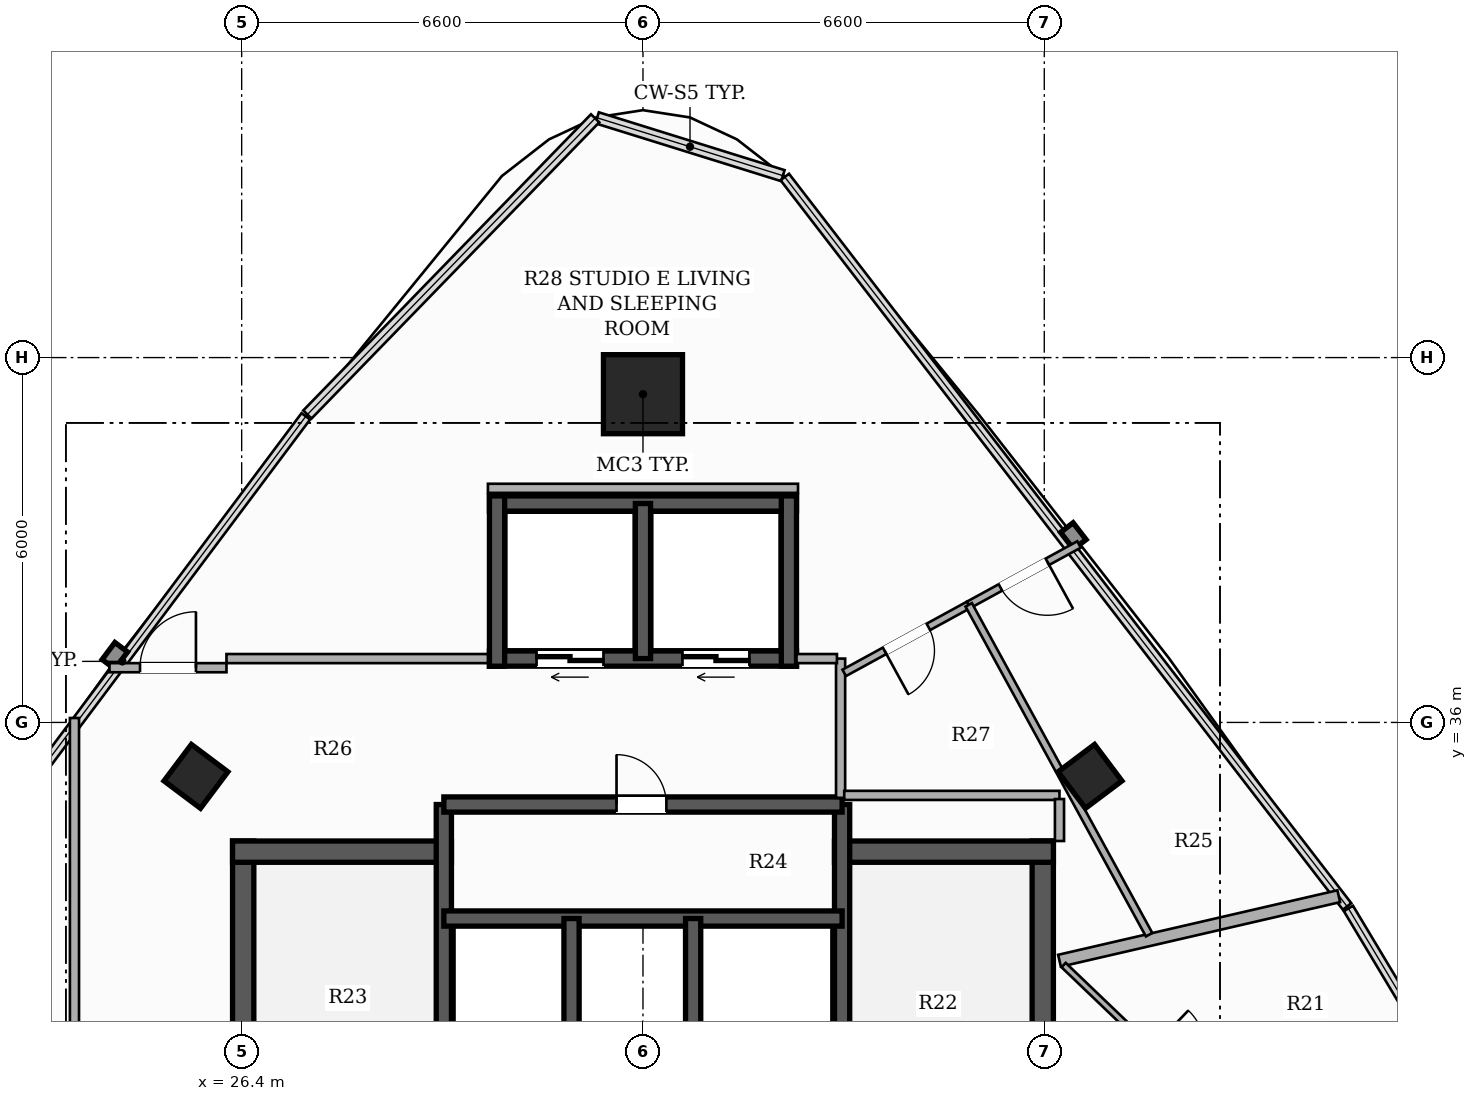
"""IFC4 building model, lengths in metres.
Left out: names, types, materials, properties, quantities, classifications, styles, units other than length and angle.
Written with IfcOpenShell. Run it as: python <this file> out.ifc"""

import sys

from ifc_helpers import new_model, si_unit, direction, frame, frame_2d, origin, origin_2d, place, context, subcontext, project, spatial, rectangle, hollow_rectangle, extrude, element, fill, save


model = new_model("IFC4")
c1 = context("Model", 3, precision=1e-05, world=origin(), true_north=direction((0.0, 1.0)))
c2 = subcontext(c1, "Body", "Model", "MODEL_VIEW")
j1 = project(units=[si_unit("LENGTHUNIT", "METRE"), si_unit("PLANEANGLEUNIT", "RADIAN")], contexts=[c1])
p1 = place(None, origin())
s1 = spatial("IfcSite", under=j1, at=p1, CompositionType="ELEMENT")
p2 = place(p1, origin())
s2 = spatial("IfcBuilding", under=s1, at=p2, CompositionType="ELEMENT")
p3 = place(p2, frame((0.0, 0.0, 222.8)))
s3 = spatial("IfcBuildingStorey", under=s2, at=p3, CompositionType="ELEMENT", Elevation=222.8)
p4 = place(p3, frame((26.425, 26.55, 0.0), z_axis=(0.0, 0.0, 1.0), x_axis=(0.0, 1.0, 0.0)))
e1 = element("IfcWall", 1, at=p4, inside=s3, PredefinedType="SHEAR", context=c2, shape_type="SweptSolid", body=[
    extrude(rectangle(XDim=7.5, YDim=0.35, at=frame_2d((3.75, 0.0))), origin(), (0.0, 0.0, 1.0), 3.3),
])
p5 = place(p3, frame((26.25, 33.875, 0.0), z_axis=(0.0, 0.0, 1.0), x_axis=(1.0, 0.0, 0.0)))
e2 = element("IfcWall", 2, at=p5, inside=s3, PredefinedType="SHEAR", context=c2, shape_type="SweptSolid", body=[
    extrude(rectangle(XDim=3.6, YDim=0.35, at=frame_2d((1.8, 0.0))), origin(), (0.0, 0.0, 1.0), 3.3),
])
p6 = place(p3, frame((39.575, 26.55, 0.0), z_axis=(0.0, 0.0, 1.0), x_axis=(0.0, 1.0, 0.0)))
e3 = element("IfcWall", 3, at=p6, inside=s3, PredefinedType="SHEAR", context=c2, shape_type="SweptSolid", body=[
    extrude(rectangle(XDim=7.5, YDim=0.35, at=frame_2d((3.75, 0.0))), origin(), (0.0, 0.0, 1.0), 3.3),
])
p7 = place(p3, frame((36.15, 33.875, 0.0), z_axis=(0.0, 0.0, 1.0), x_axis=(1.0, 0.0, 0.0)))
e4 = element("IfcWall", 4, at=p7, inside=s3, PredefinedType="SHEAR", context=c2, shape_type="SweptSolid", body=[
    extrude(rectangle(XDim=3.6, YDim=0.35, at=frame_2d((1.8, 0.0))), origin(), (0.0, 0.0, 1.0), 3.3),
])
p8 = place(p3, frame((29.725, 26.55, 0.0), z_axis=(0.0, 0.0, 1.0), x_axis=(0.0, 1.0, 0.0)))
e5 = element("IfcWall", 5, at=p8, inside=s3, PredefinedType="SHEAR", context=c2, shape_type="SweptSolid", body=[
    extrude(rectangle(XDim=8.1, YDim=0.25, at=frame_2d((4.05, 0.0))), origin(), (0.0, 0.0, 1.0), 3.3),
])
p9 = place(p8, frame((0.6, 0.0, 0.0)))
e6 = element("IfcOpeningElement", 6, at=p9, cuts=e5, PredefinedType="OPENING", context=c2, shape_type="SweptSolid", body=[
    extrude(rectangle(XDim=1.05, YDim=2.15, at=frame_2d((0.525, 1.075))), frame((0.0, 0.135, 0.0), z_axis=(0.0, -1.0, 0.0), x_axis=(1.0, 0.0, 0.0)), (0.0, 0.0, 1.0), 0.27),
])
p10 = place(p3, frame((36.275, 26.55, 0.0), z_axis=(0.0, 0.0, 1.0), x_axis=(0.0, 1.0, 0.0)))
e7 = element("IfcWall", 7, at=p10, inside=s3, PredefinedType="SHEAR", context=c2, shape_type="SweptSolid", body=[
    extrude(rectangle(XDim=8.1, YDim=0.25, at=frame_2d((4.05, 0.0))), origin(), (0.0, 0.0, 1.0), 3.3),
])
p11 = place(p10, frame((0.6, 0.0, 0.0)))
e8 = element("IfcOpeningElement", 8, at=p11, cuts=e7, PredefinedType="OPENING", context=c2, shape_type="SweptSolid", body=[
    extrude(rectangle(XDim=1.05, YDim=2.15, at=frame_2d((0.525, 1.075))), frame((0.0, 0.135, 0.0), z_axis=(0.0, -1.0, 0.0), x_axis=(1.0, 0.0, 0.0)), (0.0, 0.0, 1.0), 0.27),
])
p12 = place(p3, frame((29.725, 32.775, 0.0), z_axis=(0.0, 0.0, 1.0), x_axis=(1.0, 0.0, 0.0)))
e9 = element("IfcWall", 9, at=p12, inside=s3, PredefinedType="SHEAR", context=c2, shape_type="SweptSolid", body=[
    extrude(rectangle(XDim=6.55, YDim=0.25, at=frame_2d((3.275, 0.0))), origin(), (0.0, 0.0, 1.0), 3.3),
])
for number, where, z_axis, x_axis in (
    (10, (31.825, 29.875, 0.0), (0.0, 0.0, 1.0), (0.0, 1.0, 0.0)),
    (11, (33.825, 29.875, 0.0), (0.0, 0.0, 1.0), (0.0, 1.0, 0.0)),
):
    element("IfcWall", number, at=place(p3, frame(where, z_axis=z_axis, x_axis=x_axis)), inside=s3, PredefinedType="SHEAR", context=c2, shape_type="SweptSolid", body=[
        extrude(rectangle(XDim=2.9, YDim=0.25, at=frame_2d((1.45, 0.0))), origin(), (0.0, 0.0, 1.0), 3.3),
    ])
p13 = place(p3, frame((29.725, 34.65, 0.0), z_axis=(0.0, 0.0, 1.0), x_axis=(1.0, 0.0, 0.0)))
e12 = element("IfcWall", 12, at=p13, inside=s3, PredefinedType="SHEAR", context=c2, shape_type="SweptSolid", body=[
    extrude(rectangle(XDim=6.55, YDim=0.25, at=frame_2d((3.275, 0.0))), origin(), (0.0, 0.0, 1.0), 3.3),
])
p14 = place(p13, frame((2.84, 0.0, 0.0)))
e13 = element("IfcOpeningElement", 13, at=p14, cuts=e12, PredefinedType="OPENING", context=c2, shape_type="SweptSolid", body=[
    extrude(rectangle(XDim=0.82, YDim=2.1, at=frame_2d((0.41, 1.05))), frame((0.0, 0.135, 0.0), z_axis=(0.0, -1.0, 0.0), x_axis=(1.0, 0.0, 0.0)), (0.0, 0.0, 1.0), 0.27),
])
p15 = place(p3, frame((35.525, 37.05, 0.0), z_axis=(0.0, 0.0, 1.0), x_axis=(-1.0, 0.0, 0.0)))
e14 = element("IfcWall", 14, at=p15, inside=s3, PredefinedType="SHEAR", context=c2, shape_type="SweptSolid", body=[
    extrude(rectangle(XDim=5.05, YDim=0.25, at=frame_2d((2.525, 0.0))), origin(), (0.0, 0.0, 1.0), 3.3),
])
p16 = place(p15, frame((3.175, 0.0, 0.0)))
e15 = element("IfcOpeningElement", 15, at=p16, cuts=e14, PredefinedType="OPENING", context=c2, shape_type="SweptSolid", body=[
    extrude(rectangle(XDim=1.1, YDim=2.2, at=frame_2d((0.55, 1.1))), frame((0.0, 0.135, 0.0), z_axis=(0.0, -1.0, 0.0), x_axis=(1.0, 0.0, 0.0)), (0.0, 0.0, 1.0), 0.27),
])
p17 = place(p15, frame((0.775, 0.0, 0.0)))
e16 = element("IfcOpeningElement", 16, at=p17, cuts=e14, PredefinedType="OPENING", context=c2, shape_type="SweptSolid", body=[
    extrude(rectangle(XDim=1.1, YDim=2.2, at=frame_2d((0.55, 1.1))), frame((0.0, 0.135, 0.0), z_axis=(0.0, -1.0, 0.0), x_axis=(1.0, 0.0, 0.0)), (0.0, 0.0, 1.0), 0.27),
])
p18 = place(p3, frame((30.475, 39.6, 0.0), z_axis=(0.0, 0.0, 1.0), x_axis=(1.0, 0.0, 0.0)))
e17 = element("IfcWall", 17, at=p18, inside=s3, PredefinedType="SHEAR", context=c2, shape_type="SweptSolid", body=[
    extrude(rectangle(XDim=5.05, YDim=0.25, at=frame_2d((2.525, 0.0))), origin(), (0.0, 0.0, 1.0), 3.3),
])
for number, where, z_axis, x_axis in (
    (18, (30.6, 36.925, 0.0), (0.0, 0.0, 1.0), (0.0, 1.0, 0.0)),
    (19, (35.4, 36.925, 0.0), (0.0, 0.0, 1.0), (0.0, 1.0, 0.0)),
):
    element("IfcWall", number, at=place(p3, frame(where, z_axis=z_axis, x_axis=x_axis)), inside=s3, PredefinedType="SHEAR", context=c2, shape_type="SweptSolid", body=[
        extrude(rectangle(XDim=2.8, YDim=0.25, at=frame_2d((1.4, 0.0))), origin(), (0.0, 0.0, 1.0), 3.3),
    ])
p19 = place(p3, frame((33.0, 37.05, 0.0), z_axis=(0.0, 0.0, 1.0), x_axis=(0.0, 1.0, 0.0)))
e20 = element("IfcWall", 20, at=p19, inside=s3, PredefinedType="SHEAR", context=c2, shape_type="SweptSolid", body=[
    extrude(rectangle(XDim=2.55, YDim=0.25, at=frame_2d((1.275, 0.0))), origin(), (0.0, 0.0, 1.0), 3.3),
])
p20 = place(p3, frame((33.0, 41.398, 0.0), z_axis=(0.0, 0.0, 1.0), x_axis=(1.0, 0.0, 0.0)))
e21 = element("IfcColumn", 21, at=p20, inside=s3, PredefinedType="COLUMN", context=c2, shape_type="SweptSolid", body=[
    extrude(hollow_rectangle(XDim=1.3, YDim=1.3, WallThickness=0.04, at=origin_2d()), origin(), (0.0, 0.0, 1.0), 3.3),
])
for number, where, z_axis, x_axis in (
    (22, (25.648, 35.113, 0.0), (0.0, 0.0, 1.0), (0.6, 0.8, 0.0)),
    (23, (40.352, 35.113, 0.0), (0.0, 0.0, 1.0), (-0.6, 0.8, 0.0)),
):
    element("IfcColumn", number, at=place(p3, frame(where, z_axis=z_axis, x_axis=x_axis)), inside=s3, PredefinedType="COLUMN", context=c2, shape_type="SweptSolid", body=[
        extrude(hollow_rectangle(XDim=0.75, YDim=0.75, WallThickness=0.025, at=origin_2d()), origin(), (0.0, 0.0, 1.0), 3.3),
    ])
p21 = place(p3, frame((36.25, 34.76, 0.0), z_axis=(0.0, 0.0, 1.0), x_axis=(0.0, 1.0, 0.0)))
e24 = element("IfcWall", 24, at=p21, inside=s3, PredefinedType="PARTITIONING", context=c2, shape_type="SweptSolid", body=[
    extrude(rectangle(XDim=2.29, YDim=0.15, at=frame_2d((1.145, 0.0))), origin(), (0.0, 0.0, 1.0), 2.425),
])
p22 = place(p3, frame((35.525, 37.05, 0.0), z_axis=(0.0, 0.0, 1.0), x_axis=(1.0, 0.0, 0.0)))
e25 = element("IfcWall", 25, at=p22, inside=s3, PredefinedType="PARTITIONING", context=c2, shape_type="SweptSolid", body=[
    extrude(rectangle(XDim=0.665, YDim=0.15, at=frame_2d((0.333, 0.0))), origin(), (0.0, 0.0, 1.0), 2.425),
])
p23 = place(p3, frame((23.65, 23.91, 0.0), z_axis=(0.0, 0.0, 1.0), x_axis=(0.0, 1.0, 0.0)))
e26 = element("IfcWall", 26, at=p23, inside=s3, PredefinedType="PARTITIONING", context=c2, shape_type="SweptSolid", body=[
    extrude(rectangle(XDim=12.163, YDim=0.15, at=frame_2d((6.082, 0.0))), origin(), (0.0, 0.0, 1.0), 2.492),
])
p24 = place(p23, frame((5.622, 0.0, 0.0)))
e27 = element("IfcOpeningElement", 27, at=p24, cuts=e26, PredefinedType="OPENING", context=c2, shape_type="SweptSolid", body=[
    extrude(rectangle(XDim=0.92, YDim=2.15, at=frame_2d((0.46, 1.075))), frame((0.0, 0.085, 0.0), z_axis=(0.0, -1.0, 0.0), x_axis=(1.0, 0.0, 0.0)), (0.0, 0.0, 1.0), 0.17),
])
p25 = place(p3, frame((24.226, 36.9, 0.0), z_axis=(0.0, 0.0, 1.0), x_axis=(1.0, 0.0, 0.0)))
e28 = element("IfcWall", 28, at=p25, inside=s3, PredefinedType="PARTITIONING", context=c2, shape_type="SweptSolid", body=[
    extrude(rectangle(XDim=1.924, YDim=0.15, at=frame_2d((0.962, 0.0))), origin(), (0.0, 0.0, 1.0), 2.619),
])
p26 = place(p25, frame((0.502, 0.0, 0.0)))
e29 = element("IfcOpeningElement", 29, at=p26, cuts=e28, PredefinedType="OPENING", context=c2, shape_type="SweptSolid", body=[
    extrude(rectangle(XDim=0.92, YDim=2.15, at=frame_2d((0.46, 1.075))), frame((0.0, 0.085, 0.0), z_axis=(0.0, -1.0, 0.0), x_axis=(1.0, 0.0, 0.0)), (0.0, 0.0, 1.0), 0.17),
])
p27 = place(p3, frame((26.15, 37.05, 0.0), z_axis=(0.0, 0.0, 1.0), x_axis=(1.0, 0.0, 0.0)))
e30 = element("IfcWall", 30, at=p27, inside=s3, PredefinedType="PARTITIONING", context=c2, shape_type="SweptSolid", body=[
    extrude(rectangle(XDim=4.3, YDim=0.15, at=frame_2d((2.15, 0.0))), origin(), (0.0, 0.0, 1.0), 2.425),
])
p28 = place(p3, frame((30.45, 39.85, 0.0), z_axis=(0.0, 0.0, 1.0), x_axis=(1.0, 0.0, 0.0)))
e31 = element("IfcWall", 31, at=p28, inside=s3, PredefinedType="PARTITIONING", context=c2, shape_type="SweptSolid", body=[
    extrude(rectangle(XDim=5.1, YDim=0.15, at=frame_2d((2.55, 0.0))), origin(), (0.0, 0.0, 1.0), 2.492),
])
p29 = place(p3, frame((36.31, 34.8, 0.0), z_axis=(0.0, 0.0, 1.0), x_axis=(1.0, 0.0, 0.0)))
e32 = element("IfcWall", 32, at=p29, inside=s3, PredefinedType="PARTITIONING", context=c2, shape_type="SweptSolid", body=[
    extrude(rectangle(XDim=3.54, YDim=0.15, at=frame_2d((1.77, 0.0))), origin(), (0.0, 0.0, 1.0), 2.425),
])
p30 = place(p3, frame((39.85, 34.74, 0.0), z_axis=(0.0, 0.0, 1.0), x_axis=(0.0, -1.0, 0.0)))
e33 = element("IfcWall", 33, at=p30, inside=s3, PredefinedType="PARTITIONING", context=c2, shape_type="SweptSolid", body=[
    extrude(rectangle(XDim=0.69, YDim=0.15, at=frame_2d((0.345, 0.0))), origin(), (0.0, 0.0, 1.0), 2.773),
])
p31 = place(p3, frame((39.85, 32.081, 0.0), z_axis=(0.0, 0.0, 1.0), x_axis=(0.974339670333, 0.225082666628, 0.0)))
e34 = element("IfcWall", 34, at=p31, inside=s3, PredefinedType="PARTITIONING", context=c2, shape_type="SweptSolid", body=[
    extrude(rectangle(XDim=4.714, YDim=0.2, at=frame_2d((2.357, 0.0))), origin(), (0.0, 0.0, 1.0), 2.492),
])
p32 = place(p3, frame((39.918, 32.01, 0.0), z_axis=(0.0, 0.0, 1.0), x_axis=(0.722311203135, -0.691568164266, 0.0)))
e35 = element("IfcWall", 35, at=p32, inside=s3, PredefinedType="PARTITIONING", context=c2, shape_type="SweptSolid", body=[
    extrude(rectangle(XDim=4.876, YDim=0.1, at=frame_2d((2.438, 0.0))), origin(), (0.0, 0.0, 1.0), 2.773),
])
p33 = place(p32, frame((1.998, 0.0, 0.0)))
e36 = element("IfcOpeningElement", 36, at=p33, cuts=e35, PredefinedType="OPENING", context=c2, shape_type="SweptSolid", body=[
    extrude(rectangle(XDim=0.88, YDim=2.1, at=frame_2d((0.44, 1.05))), frame((0.0, 0.06, 0.0), z_axis=(0.0, -1.0, 0.0), x_axis=(1.0, 0.0, 0.0)), (0.0, 0.0, 1.0), 0.12),
])
p34 = place(p3, frame((38.357, 37.934, 0.0), z_axis=(0.0, 0.0, 1.0), x_axis=(-0.877415192217, -0.479731779714, 0.0)))
e37 = element("IfcWall", 37, at=p34, inside=s3, PredefinedType="PARTITIONING", context=c2, shape_type="SweptSolid", body=[
    extrude(rectangle(XDim=2.333, YDim=0.12, at=frame_2d((1.167, 0.0))), origin(), (0.0, 0.0, 1.0), 2.425),
])
p35 = place(p34, frame((0.756, 0.0, 0.0)))
e38 = element("IfcOpeningElement", 38, at=p35, cuts=e37, PredefinedType="OPENING", context=c2, shape_type="SweptSolid", body=[
    extrude(rectangle(XDim=0.82, YDim=2.1, at=frame_2d((0.41, 1.05))), frame((0.0, 0.07, 0.0), z_axis=(0.0, -1.0, 0.0), x_axis=(1.0, 0.0, 0.0)), (0.0, 0.0, 1.0), 0.14),
])
p36 = place(p3, frame((40.172, 38.927, 0.0), z_axis=(0.0, 0.0, 1.0), x_axis=(-0.877322236726, -0.479901753432, 0.0)))
e39 = element("IfcWall", 39, at=p36, inside=s3, PredefinedType="PARTITIONING", context=c2, shape_type="SweptSolid", body=[
    extrude(rectangle(XDim=2.069, YDim=0.12, at=frame_2d((1.035, 0.0))), origin(), (0.0, 0.0, 1.0), 3.06),
])
p37 = place(p36, frame((0.594, 0.0, 0.0)))
e40 = element("IfcOpeningElement", 40, at=p37, cuts=e39, PredefinedType="OPENING", context=c2, shape_type="SweptSolid", body=[
    extrude(rectangle(XDim=0.88, YDim=2.1, at=frame_2d((0.44, 1.05))), frame((0.0, 0.07, 0.0), z_axis=(0.0, -1.0, 0.0), x_axis=(1.0, 0.0, 0.0)), (0.0, 0.0, 1.0), 0.14),
])
p38 = place(p3, frame((38.357, 37.934, 0.0), z_axis=(0.0, 0.0, 1.0), x_axis=(0.479839410825, -0.877356335715, 0.0)))
e41 = element("IfcWall", 41, at=p38, inside=s3, PredefinedType="PARTITIONING", context=c2, shape_type="SweptSolid", body=[
    extrude(rectangle(XDim=6.183, YDim=0.12, at=frame_2d((3.092, 0.0))), origin(), (0.0, 0.0, 1.0), 2.492),
])
p39 = place(p16, origin())
e42 = element("IfcDoor", 42, at=p39, inside=s3, OperationType="DOUBLE_DOOR_SLIDING", PredefinedType="DOOR", context=c2, shape_type="SweptSolid", body=[
    extrude(rectangle(XDim=1.1, YDim=2.2, at=frame_2d((0.55, 1.1))), frame((0.0, 0.025, 0.0), z_axis=(0.0, -1.0, 0.0), x_axis=(1.0, 0.0, 0.0)), (0.0, 0.0, 1.0), 0.05),
])
fill(e15, e42)
p40 = place(p17, origin())
e43 = element("IfcDoor", 43, at=p40, inside=s3, OperationType="DOUBLE_DOOR_SLIDING", PredefinedType="DOOR", context=c2, shape_type="SweptSolid", body=[
    extrude(rectangle(XDim=1.1, YDim=2.2, at=frame_2d((0.55, 1.1))), frame((0.0, 0.025, 0.0), z_axis=(0.0, -1.0, 0.0), x_axis=(1.0, 0.0, 0.0)), (0.0, 0.0, 1.0), 0.05),
])
fill(e16, e43)
p41 = place(p14, origin())
e44 = element("IfcDoor", 44, at=p41, inside=s3, OperationType="SINGLE_SWING_LEFT", PredefinedType="DOOR", context=c2, shape_type="SweptSolid", body=[
    extrude(rectangle(XDim=0.82, YDim=2.1, at=frame_2d((0.41, 1.05))), frame((0.0, 0.025, 0.0), z_axis=(0.0, -1.0, 0.0), x_axis=(1.0, 0.0, 0.0)), (0.0, 0.0, 1.0), 0.05),
])
fill(e13, e44)
p42 = place(p26, origin())
e45 = element("IfcDoor", 45, at=p42, inside=s3, OperationType="SINGLE_SWING_RIGHT", PredefinedType="DOOR", context=c2, shape_type="SweptSolid", body=[
    extrude(rectangle(XDim=0.92, YDim=2.15, at=frame_2d((0.46, 1.075))), frame((0.0, 0.025, 0.0), z_axis=(0.0, -1.0, 0.0), x_axis=(1.0, 0.0, 0.0)), (0.0, 0.0, 1.0), 0.05),
])
fill(e29, e45)
p43 = place(p35, origin())
e46 = element("IfcDoor", 46, at=p43, inside=s3, OperationType="SINGLE_SWING_RIGHT", PredefinedType="DOOR", context=c2, shape_type="SweptSolid", body=[
    extrude(rectangle(XDim=0.82, YDim=2.1, at=frame_2d((0.41, 1.05))), frame((0.0, 0.025, 0.0), z_axis=(0.0, -1.0, 0.0), x_axis=(1.0, 0.0, 0.0)), (0.0, 0.0, 1.0), 0.05),
])
fill(e38, e46)
p44 = place(p37, origin())
e47 = element("IfcDoor", 47, at=p44, inside=s3, OperationType="SINGLE_SWING_LEFT", PredefinedType="DOOR", context=c2, shape_type="SweptSolid", body=[
    extrude(rectangle(XDim=0.88, YDim=2.1, at=frame_2d((0.44, 1.05))), frame((0.0, 0.025, 0.0), z_axis=(0.0, -1.0, 0.0), x_axis=(1.0, 0.0, 0.0)), (0.0, 0.0, 1.0), 0.05),
])
fill(e40, e47)
save(model, sys.argv[1])
